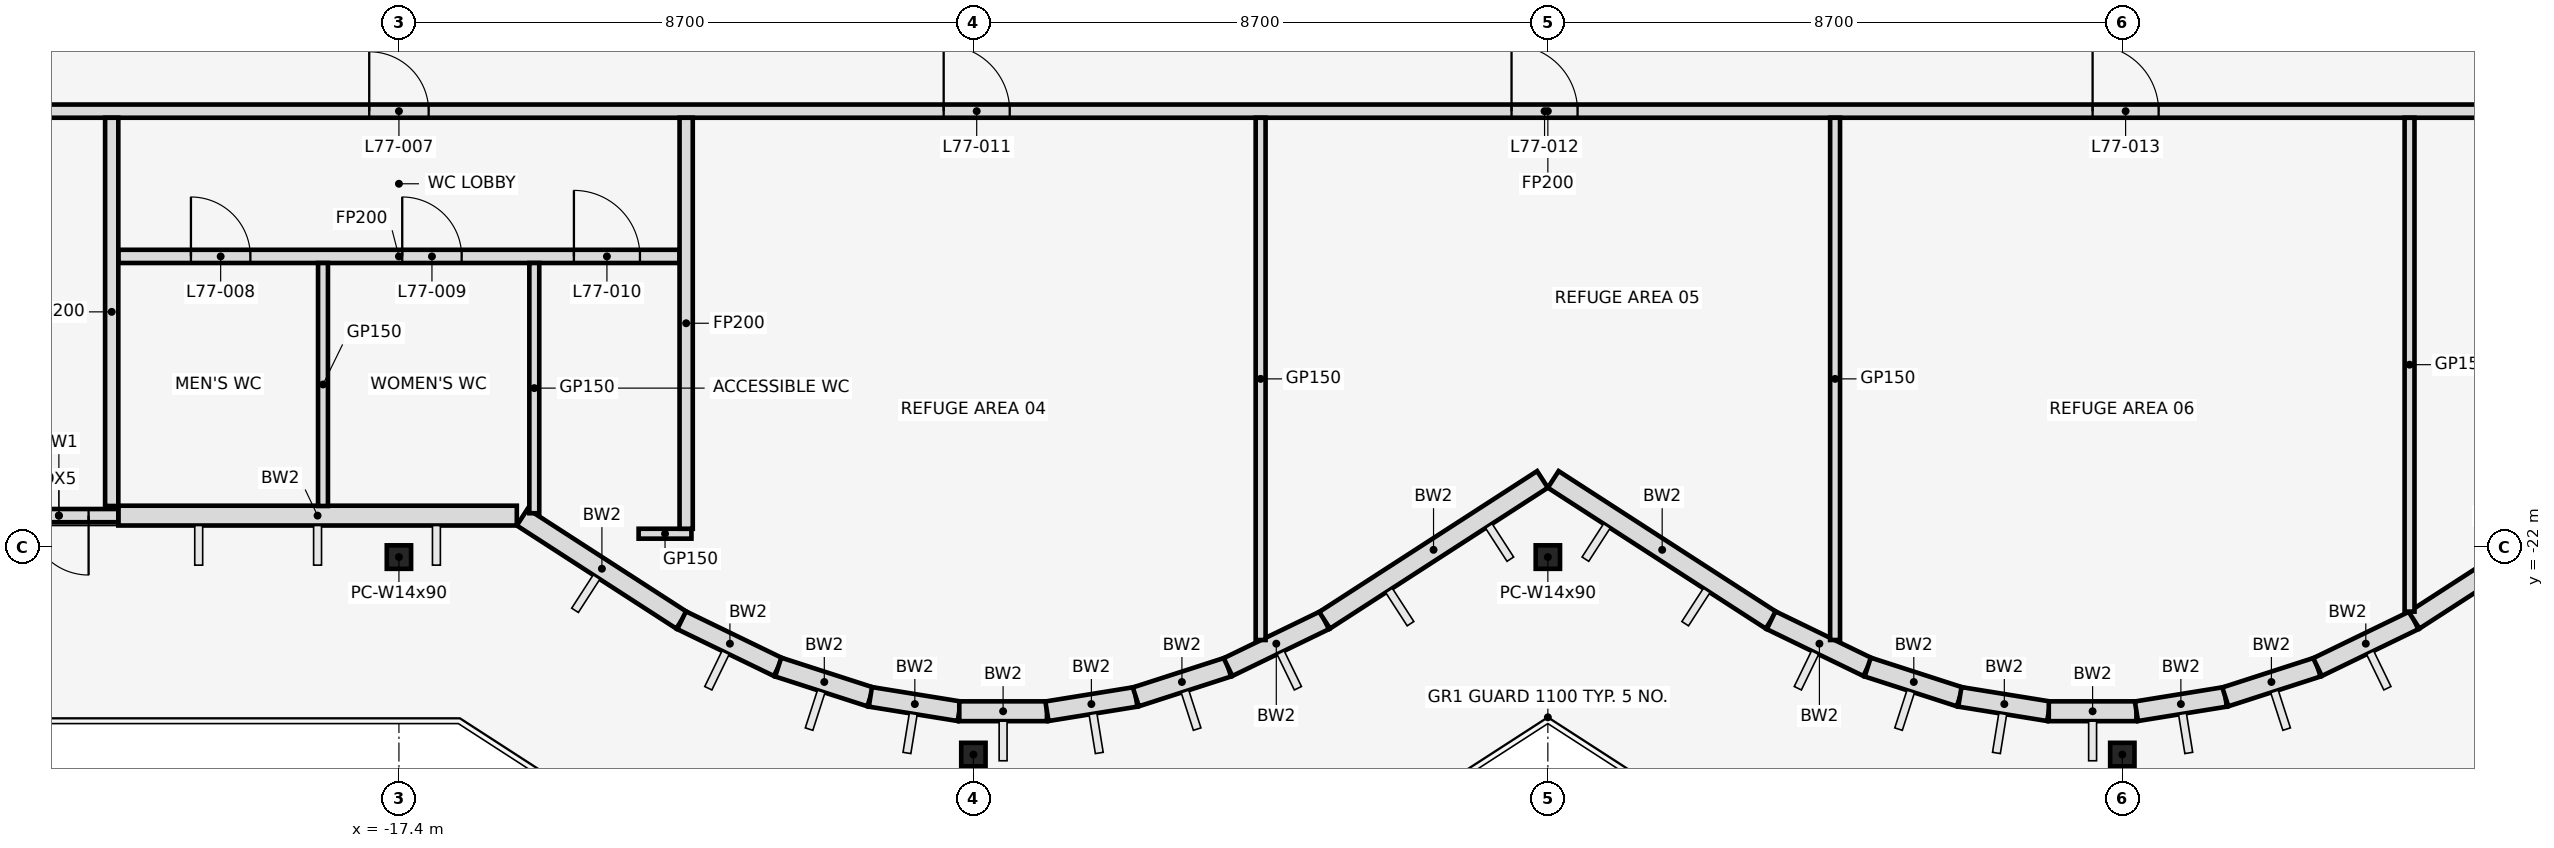
"""IFC4 building model, lengths in metres.
Left out: names, types, materials, properties, quantities, classifications, styles, units other than length and angle.
Written with IfcOpenShell. Run it as: python <this file> out.ifc"""

import sys

from ifc_helpers import new_model, si_unit, direction, frame, frame_2d, origin, origin_2d, place, context, subcontext, project, spatial, rectangle, i_section, extrude, element, fill, save


model = new_model("IFC4")
c1 = context("Model", 3, precision=1e-05, world=origin(), true_north=direction((0.0, 1.0)))
c2 = subcontext(c1, "Body", "Model", "MODEL_VIEW")
j1 = project(units=[si_unit("LENGTHUNIT", "METRE"), si_unit("PLANEANGLEUNIT", "RADIAN")], contexts=[c1])
p1 = place(None, origin())
s1 = spatial("IfcSite", under=j1, at=p1, CompositionType="ELEMENT")
p2 = place(p1, origin())
s2 = spatial("IfcBuilding", under=s1, at=p2, CompositionType="ELEMENT")
p3 = place(p2, frame((0.0, 0.0, 342.5)))
s3 = spatial("IfcBuildingStorey", under=s2, at=p3, CompositionType="ELEMENT", Elevation=342.5)
for number, where, z_axis, x_axis in (
    (1, (-17.4, -22.154, 0.0), (0.0, 0.0, 1.0), (1.0, 0.0, 0.0)),
    (2, (-8.7, -25.145, 0.0), (0.0, 0.0, 1.0), (1.0, 0.0, 0.0)),
    (3, (0.0, -22.154, 0.0), (0.0, 0.0, 1.0), (1.0, 0.0, 0.0)),
    (4, (8.7, -25.145, 0.0), (0.0, 0.0, 1.0), (1.0, 0.0, 0.0)),
):
    element("IfcColumn", number, at=place(p3, frame(where, z_axis=z_axis, x_axis=x_axis)), inside=s3, PredefinedType="COLUMN", context=c2, shape_type="SweptSolid", body=[
        extrude(i_section(OverallWidth=0.368, OverallDepth=0.356, WebThickness=0.011, FlangeThickness=0.018, at=origin_2d()), origin(), (0.0, 0.0, 1.0), 5.4),
    ])
p4 = place(p3, frame((-21.65, -21.526, 0.0), z_axis=(0.0, 0.0, 1.0), x_axis=(1.0, 0.0, 0.0)))
e5 = element("IfcWall", 5, at=p4, inside=s3, PredefinedType="STANDARD", context=c2, shape_type="SweptSolid", body=[
    extrude(rectangle(XDim=6.035, YDim=0.3, at=frame_2d((3.018, 0.0))), origin(), (0.0, 0.0, 1.0), 4.745),
])
p5 = place(p3, frame((-15.533, -21.55, 0.0), z_axis=(0.0, 0.0, 1.0), x_axis=(0.839779682339, -0.542927329512, 0.0)))
e6 = element("IfcWall", 6, at=p5, inside=s3, PredefinedType="STANDARD", context=c2, shape_type="SweptSolid", body=[
    extrude(rectangle(XDim=2.875, YDim=0.3, at=frame_2d((1.438, 0.0))), origin(), (0.0, 0.0, 1.0), 4.672),
])
p6 = place(p3, frame((-13.119, -23.111, 0.0), z_axis=(0.0, 0.0, 1.0), x_axis=(0.899798026589, -0.436306671214, 0.0)))
e7 = element("IfcWall", 7, at=p6, inside=s3, PredefinedType="STANDARD", context=c2, shape_type="SweptSolid", body=[
    extrude(rectangle(XDim=1.625, YDim=0.3, at=frame_2d((0.813, 0.0))), origin(), (0.0, 0.0, 1.0), 4.672),
])
p7 = place(p3, frame((-11.656, -23.82, 0.0), z_axis=(0.0, 0.0, 1.0), x_axis=(0.951539081691, -0.307527845919, 0.0)))
e8 = element("IfcWall", 8, at=p7, inside=s3, PredefinedType="STANDARD", context=c2, shape_type="SweptSolid", body=[
    extrude(rectangle(XDim=1.467, YDim=0.3, at=frame_2d((0.733, 0.0))), origin(), (0.0, 0.0, 1.0), 5.2),
])
p8 = place(p3, frame((-10.26, -24.271, 0.0), z_axis=(0.0, 0.0, 1.0), x_axis=(0.987194777017, -0.15951950423, 0.0)))
e9 = element("IfcWall", 9, at=p8, inside=s3, PredefinedType="STANDARD", context=c2, shape_type="SweptSolid", body=[
    extrude(rectangle(XDim=1.364, YDim=0.3, at=frame_2d((0.682, 0.0))), origin(), (0.0, 0.0, 1.0), 4.601),
])
p9 = place(p3, frame((-8.914, -24.489, 0.0), z_axis=(0.0, 0.0, 1.0), x_axis=(1.0, 0.0, 0.0)))
e10 = element("IfcWall", 10, at=p9, inside=s3, PredefinedType="STANDARD", context=c2, shape_type="SweptSolid", body=[
    extrude(rectangle(XDim=1.328, YDim=0.3, at=frame_2d((0.664, 0.0))), origin(), (0.0, 0.0, 1.0), 4.601),
])
p10 = place(p3, frame((-7.586, -24.489, 0.0), z_axis=(0.0, 0.0, 1.0), x_axis=(0.987194777017, 0.15951950423, 0.0)))
e11 = element("IfcWall", 11, at=p10, inside=s3, PredefinedType="STANDARD", context=c2, shape_type="SweptSolid", body=[
    extrude(rectangle(XDim=1.364, YDim=0.3, at=frame_2d((0.682, 0.0))), origin(), (0.0, 0.0, 1.0), 5.2),
])
p11 = place(p3, frame((-6.24, -24.271, 0.0), z_axis=(0.0, 0.0, 1.0), x_axis=(0.951539081691, 0.307527845919, 0.0)))
e12 = element("IfcWall", 12, at=p11, inside=s3, PredefinedType="STANDARD", context=c2, shape_type="SweptSolid", body=[
    extrude(rectangle(XDim=1.467, YDim=0.3, at=frame_2d((0.733, 0.0))), origin(), (0.0, 0.0, 1.0), 5.2),
])
p12 = place(p3, frame((-4.844, -23.82, 0.0), z_axis=(0.0, 0.0, 1.0), x_axis=(0.899798026589, 0.436306671214, 0.0)))
e13 = element("IfcWall", 13, at=p12, inside=s3, PredefinedType="STANDARD", context=c2, shape_type="SweptSolid", body=[
    extrude(rectangle(XDim=1.625, YDim=0.3, at=frame_2d((0.813, 0.0))), origin(), (0.0, 0.0, 1.0), 4.672),
])
for number, where, z_axis, x_axis in (
    (14, (-3.381, -23.111, 0.0), (0.0, 0.0, 1.0), (0.84, 0.543, 0.0)),
    (15, (0.081, -20.978, 0.0), (0.0, 0.0, 1.0), (0.84, -0.543, 0.0)),
):
    element("IfcWall", number, at=place(p3, frame(where, z_axis=z_axis, x_axis=x_axis)), inside=s3, PredefinedType="STANDARD", context=c2, shape_type="SweptSolid", body=[
        extrude(rectangle(XDim=3.929, YDim=0.3, at=frame_2d((1.965, 0.0))), origin(), (0.0, 0.0, 1.0), 4.745),
    ])
p13 = place(p3, frame((3.381, -23.111, 0.0), z_axis=(0.0, 0.0, 1.0), x_axis=(0.899798026589, -0.436306671214, 0.0)))
e16 = element("IfcWall", 16, at=p13, inside=s3, PredefinedType="STANDARD", context=c2, shape_type="SweptSolid", body=[
    extrude(rectangle(XDim=1.625, YDim=0.3, at=frame_2d((0.813, 0.0))), origin(), (0.0, 0.0, 1.0), 4.672),
])
p14 = place(p3, frame((4.844, -23.82, 0.0), z_axis=(0.0, 0.0, 1.0), x_axis=(0.951539081691, -0.307527845919, 0.0)))
e17 = element("IfcWall", 17, at=p14, inside=s3, PredefinedType="STANDARD", context=c2, shape_type="SweptSolid", body=[
    extrude(rectangle(XDim=1.467, YDim=0.3, at=frame_2d((0.733, 0.0))), origin(), (0.0, 0.0, 1.0), 5.2),
])
p15 = place(p3, frame((6.24, -24.271, 0.0), z_axis=(0.0, 0.0, 1.0), x_axis=(0.987194777017, -0.15951950423, 0.0)))
e18 = element("IfcWall", 18, at=p15, inside=s3, PredefinedType="STANDARD", context=c2, shape_type="SweptSolid", body=[
    extrude(rectangle(XDim=1.364, YDim=0.3, at=frame_2d((0.682, 0.0))), origin(), (0.0, 0.0, 1.0), 5.2),
])
p16 = place(p3, frame((7.586, -24.489, 0.0), z_axis=(0.0, 0.0, 1.0), x_axis=(1.0, 0.0, 0.0)))
e19 = element("IfcWall", 19, at=p16, inside=s3, PredefinedType="STANDARD", context=c2, shape_type="SweptSolid", body=[
    extrude(rectangle(XDim=1.328, YDim=0.3, at=frame_2d((0.664, 0.0))), origin(), (0.0, 0.0, 1.0), 4.601),
])
p17 = place(p3, frame((8.914, -24.489, 0.0), z_axis=(0.0, 0.0, 1.0), x_axis=(0.987194777017, 0.15951950423, 0.0)))
e20 = element("IfcWall", 20, at=p17, inside=s3, PredefinedType="STANDARD", context=c2, shape_type="SweptSolid", body=[
    extrude(rectangle(XDim=1.364, YDim=0.3, at=frame_2d((0.682, 0.0))), origin(), (0.0, 0.0, 1.0), 4.601),
])
p18 = place(p3, frame((10.26, -24.271, 0.0), z_axis=(0.0, 0.0, 1.0), x_axis=(0.951539081691, 0.307527845919, 0.0)))
e21 = element("IfcWall", 21, at=p18, inside=s3, PredefinedType="STANDARD", context=c2, shape_type="SweptSolid", body=[
    extrude(rectangle(XDim=1.467, YDim=0.3, at=frame_2d((0.733, 0.0))), origin(), (0.0, 0.0, 1.0), 5.2),
])
p19 = place(p3, frame((11.656, -23.82, 0.0), z_axis=(0.0, 0.0, 1.0), x_axis=(0.899798026589, 0.436306671214, 0.0)))
e22 = element("IfcWall", 22, at=p19, inside=s3, PredefinedType="STANDARD", context=c2, shape_type="SweptSolid", body=[
    extrude(rectangle(XDim=1.625, YDim=0.3, at=frame_2d((0.813, 0.0))), origin(), (0.0, 0.0, 1.0), 4.672),
])
p20 = place(p3, frame((13.119, -23.111, 0.0), z_axis=(0.0, 0.0, 1.0), x_axis=(0.839779682339, 0.542927329512, 0.0)))
e23 = element("IfcWall", 23, at=p20, inside=s3, PredefinedType="STANDARD", context=c2, shape_type="SweptSolid", body=[
    extrude(rectangle(XDim=2.875, YDim=0.3, at=frame_2d((1.438, 0.0))), origin(), (0.0, 0.0, 1.0), 4.672),
])
p21 = place(p3, frame((-21.65, -21.526, 0.0), z_axis=(0.0, 0.0, 1.0), x_axis=(-1.0, 0.0, 0.0)))
e24 = element("IfcWall", 24, at=p21, inside=s3, PredefinedType="STANDARD", context=c2, shape_type="SweptSolid", body=[
    extrude(rectangle(XDim=1.8, YDim=0.2, at=frame_2d((0.9, 0.0))), origin(), (0.0, 0.0, 1.0), 5.2),
])
p22 = place(p21, frame((0.45, 0.0, 0.0)))
e25 = element("IfcOpeningElement", 25, at=p22, cuts=e24, PredefinedType="OPENING", context=c2, shape_type="SweptSolid", body=[
    extrude(rectangle(XDim=0.9, YDim=2.1, at=frame_2d((0.45, 1.05))), frame((0.0, 0.112, 0.0), z_axis=(0.0, -1.0, 0.0), x_axis=(1.0, 0.0, 0.0)), (0.0, 0.0, 1.0), 0.224),
])
p23 = place(p3, frame((-13.77, -21.8, 0.0), z_axis=(0.0, 0.0, 1.0), x_axis=(1.0, 0.0, 0.0)))
e26 = element("IfcWall", 26, at=p23, inside=s3, PredefinedType="PARTITIONING", context=c2, shape_type="SweptSolid", body=[
    extrude(rectangle(XDim=0.8, YDim=0.15, at=frame_2d((0.4, 0.0))), origin(), (0.0, 0.0, 1.0), 4.268),
])
p24 = place(p3, frame((-21.65, -17.6, 0.0), z_axis=(0.0, 0.0, 1.0), x_axis=(1.0, 0.0, 0.0)))
e27 = element("IfcWall", 27, at=p24, inside=s3, PredefinedType="PARTITIONING", context=c2, shape_type="SweptSolid", body=[
    extrude(rectangle(XDim=8.5, YDim=0.2, at=frame_2d((4.25, 0.0))), origin(), (0.0, 0.0, 1.0), 4.268),
])
p25 = place(p24, frame((1.1, 0.0, 0.0)))
e28 = element("IfcOpeningElement", 28, at=p25, cuts=e27, PredefinedType="OPENING", context=c2, shape_type="SweptSolid", body=[
    extrude(rectangle(XDim=0.9, YDim=2.1, at=frame_2d((0.45, 1.05))), frame((0.0, 0.112, 0.0), z_axis=(0.0, -1.0, 0.0), x_axis=(1.0, 0.0, 0.0)), (0.0, 0.0, 1.0), 0.224),
])
p26 = place(p24, frame((4.3, 0.0, 0.0)))
e29 = element("IfcOpeningElement", 29, at=p26, cuts=e27, PredefinedType="OPENING", context=c2, shape_type="SweptSolid", body=[
    extrude(rectangle(XDim=0.9, YDim=2.1, at=frame_2d((0.45, 1.05))), frame((0.0, 0.112, 0.0), z_axis=(0.0, -1.0, 0.0), x_axis=(1.0, 0.0, 0.0)), (0.0, 0.0, 1.0), 0.224),
])
p27 = place(p24, frame((6.9, 0.0, 0.0)))
e30 = element("IfcOpeningElement", 30, at=p27, cuts=e27, PredefinedType="OPENING", context=c2, shape_type="SweptSolid", body=[
    extrude(rectangle(XDim=1.0, YDim=2.1, at=frame_2d((0.5, 1.05))), frame((0.0, 0.112, 0.0), z_axis=(0.0, -1.0, 0.0), x_axis=(1.0, 0.0, 0.0)), (0.0, 0.0, 1.0), 0.224),
])
p28 = place(p3, frame((-32.7, -15.4, 0.0), z_axis=(0.0, 0.0, 1.0), x_axis=(1.0, 0.0, 0.0)))
e31 = element("IfcWall", 31, at=p28, inside=s3, PredefinedType="PARTITIONING", context=c2, shape_type="SweptSolid", body=[
    extrude(rectangle(XDim=65.4, YDim=0.2, at=frame_2d((32.7, 0.0))), origin(), (0.0, 0.0, 1.0), 4.268),
])
p29 = place(p28, frame((0.7, 0.0, 0.0)))
e32 = element("IfcOpeningElement", 32, at=p29, cuts=e31, PredefinedType="OPENING", context=c2, shape_type="SweptSolid", body=[
    extrude(rectangle(XDim=0.9, YDim=2.1, at=frame_2d((0.45, 1.05))), frame((0.0, 0.112, 0.0), z_axis=(0.0, -1.0, 0.0), x_axis=(1.0, 0.0, 0.0)), (0.0, 0.0, 1.0), 0.224),
])
p30 = place(p28, frame((7.95, 0.0, 0.0)))
e33 = element("IfcOpeningElement", 33, at=p30, cuts=e31, PredefinedType="OPENING", context=c2, shape_type="SweptSolid", body=[
    extrude(rectangle(XDim=1.0, YDim=2.1, at=frame_2d((0.5, 1.05))), frame((0.0, 0.112, 0.0), z_axis=(0.0, -1.0, 0.0), x_axis=(1.0, 0.0, 0.0)), (0.0, 0.0, 1.0), 0.224),
])
p31 = place(p28, frame((14.85, 0.0, 0.0)))
e34 = element("IfcOpeningElement", 34, at=p31, cuts=e31, PredefinedType="OPENING", context=c2, shape_type="SweptSolid", body=[
    extrude(rectangle(XDim=0.9, YDim=2.1, at=frame_2d((0.45, 1.05))), frame((0.0, 0.112, 0.0), z_axis=(0.0, -1.0, 0.0), x_axis=(1.0, 0.0, 0.0)), (0.0, 0.0, 1.0), 0.224),
])
p32 = place(p28, frame((23.55, 0.0, 0.0)))
e35 = element("IfcOpeningElement", 35, at=p32, cuts=e31, PredefinedType="OPENING", context=c2, shape_type="SweptSolid", body=[
    extrude(rectangle(XDim=1.0, YDim=2.1, at=frame_2d((0.5, 1.05))), frame((0.0, 0.112, 0.0), z_axis=(0.0, -1.0, 0.0), x_axis=(1.0, 0.0, 0.0)), (0.0, 0.0, 1.0), 0.224),
])
p33 = place(p28, frame((32.15, 0.0, 0.0)))
e36 = element("IfcOpeningElement", 36, at=p33, cuts=e31, PredefinedType="OPENING", context=c2, shape_type="SweptSolid", body=[
    extrude(rectangle(XDim=1.0, YDim=2.1, at=frame_2d((0.5, 1.05))), frame((0.0, 0.112, 0.0), z_axis=(0.0, -1.0, 0.0), x_axis=(1.0, 0.0, 0.0)), (0.0, 0.0, 1.0), 0.224),
])
p34 = place(p28, frame((40.95, 0.0, 0.0)))
e37 = element("IfcOpeningElement", 37, at=p34, cuts=e31, PredefinedType="OPENING", context=c2, shape_type="SweptSolid", body=[
    extrude(rectangle(XDim=1.0, YDim=2.1, at=frame_2d((0.5, 1.05))), frame((0.0, 0.112, 0.0), z_axis=(0.0, -1.0, 0.0), x_axis=(1.0, 0.0, 0.0)), (0.0, 0.0, 1.0), 0.224),
])
p35 = place(p28, frame((49.55, 0.0, 0.0)))
e38 = element("IfcOpeningElement", 38, at=p35, cuts=e31, PredefinedType="OPENING", context=c2, shape_type="SweptSolid", body=[
    extrude(rectangle(XDim=1.0, YDim=2.1, at=frame_2d((0.5, 1.05))), frame((0.0, 0.112, 0.0), z_axis=(0.0, -1.0, 0.0), x_axis=(1.0, 0.0, 0.0)), (0.0, 0.0, 1.0), 0.224),
])
p36 = place(p28, frame((56.45, 0.0, 0.0)))
e39 = element("IfcOpeningElement", 39, at=p36, cuts=e31, PredefinedType="OPENING", context=c2, shape_type="SweptSolid", body=[
    extrude(rectangle(XDim=1.0, YDim=2.1, at=frame_2d((0.5, 1.05))), frame((0.0, 0.112, 0.0), z_axis=(0.0, -1.0, 0.0), x_axis=(1.0, 0.0, 0.0)), (0.0, 0.0, 1.0), 0.224),
])
p37 = place(p28, frame((63.85, 0.0, 0.0)))
e40 = element("IfcOpeningElement", 40, at=p37, cuts=e31, PredefinedType="OPENING", context=c2, shape_type="SweptSolid", body=[
    extrude(rectangle(XDim=0.9, YDim=2.1, at=frame_2d((0.45, 1.05))), frame((0.0, 0.112, 0.0), z_axis=(0.0, -1.0, 0.0), x_axis=(1.0, 0.0, 0.0)), (0.0, 0.0, 1.0), 0.224),
])
p38 = place(p3, frame((-21.75, -21.38, 0.0), z_axis=(0.0, 0.0, 1.0), x_axis=(0.0, 1.0, 0.0)))
e41 = element("IfcWall", 41, at=p38, inside=s3, PredefinedType="PARTITIONING", context=c2, shape_type="SweptSolid", body=[
    extrude(rectangle(XDim=5.88, YDim=0.2, at=frame_2d((2.94, 0.0))), origin(), (0.0, 0.0, 1.0), 4.268),
])
p39 = place(p3, frame((-18.55, -21.38, 0.0), z_axis=(0.0, 0.0, 1.0), x_axis=(0.0, 1.0, 0.0)))
e42 = element("IfcWall", 42, at=p39, inside=s3, PredefinedType="PARTITIONING", context=c2, shape_type="SweptSolid", body=[
    extrude(rectangle(XDim=3.68, YDim=0.15, at=frame_2d((1.84, 0.0))), origin(), (0.0, 0.0, 1.0), 4.268),
])
p40 = place(p3, frame((-15.35, -21.49, 0.0), z_axis=(0.0, 0.0, 1.0), x_axis=(0.0, 1.0, 0.0)))
e43 = element("IfcWall", 43, at=p40, inside=s3, PredefinedType="PARTITIONING", context=c2, shape_type="SweptSolid", body=[
    extrude(rectangle(XDim=3.79, YDim=0.15, at=frame_2d((1.895, 0.0))), origin(), (0.0, 0.0, 1.0), 4.268),
])
p41 = place(p3, frame((-13.05, -21.725, 0.0), z_axis=(0.0, 0.0, 1.0), x_axis=(0.0, 1.0, 0.0)))
e44 = element("IfcWall", 44, at=p41, inside=s3, PredefinedType="PARTITIONING", context=c2, shape_type="SweptSolid", body=[
    extrude(rectangle(XDim=6.225, YDim=0.2, at=frame_2d((3.113, 0.0))), origin(), (0.0, 0.0, 1.0), 4.268),
])
for number, where, z_axis, x_axis in (
    (45, (-4.35, -23.41, 0.0), (0.0, 0.0, 1.0), (0.0, 1.0, 0.0)),
    (46, (4.35, -23.41, 0.0), (0.0, 0.0, 1.0), (0.0, 1.0, 0.0)),
):
    element("IfcWall", number, at=place(p3, frame(where, z_axis=z_axis, x_axis=x_axis)), inside=s3, PredefinedType="PARTITIONING", context=c2, shape_type="SweptSolid", body=[
        extrude(rectangle(XDim=7.91, YDim=0.15, at=frame_2d((3.955, 0.0))), origin(), (0.0, 0.0, 1.0), 4.268),
    ])
p42 = place(p3, frame((13.05, -22.98, 0.0), z_axis=(0.0, 0.0, 1.0), x_axis=(0.0, 1.0, 0.0)))
e47 = element("IfcWall", 47, at=p42, inside=s3, PredefinedType="PARTITIONING", context=c2, shape_type="SweptSolid", body=[
    extrude(rectangle(XDim=7.48, YDim=0.15, at=frame_2d((3.74, 0.0))), origin(), (0.0, 0.0, 1.0), 4.268),
])
p43 = place(p22, origin())
e48 = element("IfcDoor", 48, at=p43, inside=s3, OperationType="SINGLE_SWING_LEFT", PredefinedType="DOOR", context=c2, shape_type="SweptSolid", body=[
    extrude(rectangle(XDim=0.9, YDim=2.1, at=frame_2d((0.45, 1.05))), frame((0.0, 0.025, 0.0), z_axis=(0.0, -1.0, 0.0), x_axis=(1.0, 0.0, 0.0)), (0.0, 0.0, 1.0), 0.05),
])
fill(e25, e48)
p44 = place(p31, frame((0.9, 0.0, 0.0), z_axis=(0.0, 0.0, 1.0), x_axis=(-1.0, 0.0, 0.0)))
e49 = element("IfcDoor", 49, at=p44, inside=s3, OperationType="SINGLE_SWING_LEFT", PredefinedType="DOOR", context=c2, shape_type="SweptSolid", body=[
    extrude(rectangle(XDim=0.9, YDim=2.1, at=frame_2d((0.45, 1.05))), frame((0.0, 0.025, 0.0), z_axis=(0.0, -1.0, 0.0), x_axis=(1.0, 0.0, 0.0)), (0.0, 0.0, 1.0), 0.05),
])
fill(e34, e49)
p45 = place(p25, frame((0.9, 0.0, 0.0), z_axis=(0.0, 0.0, 1.0), x_axis=(-1.0, 0.0, 0.0)))
e50 = element("IfcDoor", 50, at=p45, inside=s3, OperationType="SINGLE_SWING_RIGHT", PredefinedType="DOOR", context=c2, shape_type="SweptSolid", body=[
    extrude(rectangle(XDim=0.9, YDim=2.1, at=frame_2d((0.45, 1.05))), frame((0.0, 0.025, 0.0), z_axis=(0.0, -1.0, 0.0), x_axis=(1.0, 0.0, 0.0)), (0.0, 0.0, 1.0), 0.05),
])
fill(e28, e50)
p46 = place(p26, frame((0.9, 0.0, 0.0), z_axis=(0.0, 0.0, 1.0), x_axis=(-1.0, 0.0, 0.0)))
e51 = element("IfcDoor", 51, at=p46, inside=s3, OperationType="SINGLE_SWING_RIGHT", PredefinedType="DOOR", context=c2, shape_type="SweptSolid", body=[
    extrude(rectangle(XDim=0.9, YDim=2.1, at=frame_2d((0.45, 1.05))), frame((0.0, 0.025, 0.0), z_axis=(0.0, -1.0, 0.0), x_axis=(1.0, 0.0, 0.0)), (0.0, 0.0, 1.0), 0.05),
])
fill(e29, e51)
p47 = place(p27, frame((1.0, 0.0, 0.0), z_axis=(0.0, 0.0, 1.0), x_axis=(-1.0, 0.0, 0.0)))
e52 = element("IfcDoor", 52, at=p47, inside=s3, OperationType="SINGLE_SWING_LEFT", PredefinedType="DOOR", context=c2, shape_type="SweptSolid", body=[
    extrude(rectangle(XDim=1.0, YDim=2.1, at=frame_2d((0.5, 1.05))), frame((0.0, 0.025, 0.0), z_axis=(0.0, -1.0, 0.0), x_axis=(1.0, 0.0, 0.0)), (0.0, 0.0, 1.0), 0.05),
])
fill(e30, e52)
p48 = place(p32, frame((1.0, 0.0, 0.0), z_axis=(0.0, 0.0, 1.0), x_axis=(-1.0, 0.0, 0.0)))
e53 = element("IfcDoor", 53, at=p48, inside=s3, OperationType="SINGLE_SWING_RIGHT", PredefinedType="DOOR", context=c2, shape_type="SweptSolid", body=[
    extrude(rectangle(XDim=1.0, YDim=2.1, at=frame_2d((0.5, 1.05))), frame((0.0, 0.025, 0.0), z_axis=(0.0, -1.0, 0.0), x_axis=(1.0, 0.0, 0.0)), (0.0, 0.0, 1.0), 0.05),
])
fill(e35, e53)
p49 = place(p33, frame((1.0, 0.0, 0.0), z_axis=(0.0, 0.0, 1.0), x_axis=(-1.0, 0.0, 0.0)))
e54 = element("IfcDoor", 54, at=p49, inside=s3, OperationType="SINGLE_SWING_RIGHT", PredefinedType="DOOR", context=c2, shape_type="SweptSolid", body=[
    extrude(rectangle(XDim=1.0, YDim=2.1, at=frame_2d((0.5, 1.05))), frame((0.0, 0.025, 0.0), z_axis=(0.0, -1.0, 0.0), x_axis=(1.0, 0.0, 0.0)), (0.0, 0.0, 1.0), 0.05),
])
fill(e36, e54)
p50 = place(p34, frame((1.0, 0.0, 0.0), z_axis=(0.0, 0.0, 1.0), x_axis=(-1.0, 0.0, 0.0)))
e55 = element("IfcDoor", 55, at=p50, inside=s3, OperationType="SINGLE_SWING_LEFT", PredefinedType="DOOR", context=c2, shape_type="SweptSolid", body=[
    extrude(rectangle(XDim=1.0, YDim=2.1, at=frame_2d((0.5, 1.05))), frame((0.0, 0.025, 0.0), z_axis=(0.0, -1.0, 0.0), x_axis=(1.0, 0.0, 0.0)), (0.0, 0.0, 1.0), 0.05),
])
fill(e37, e55)
save(model, sys.argv[1])
